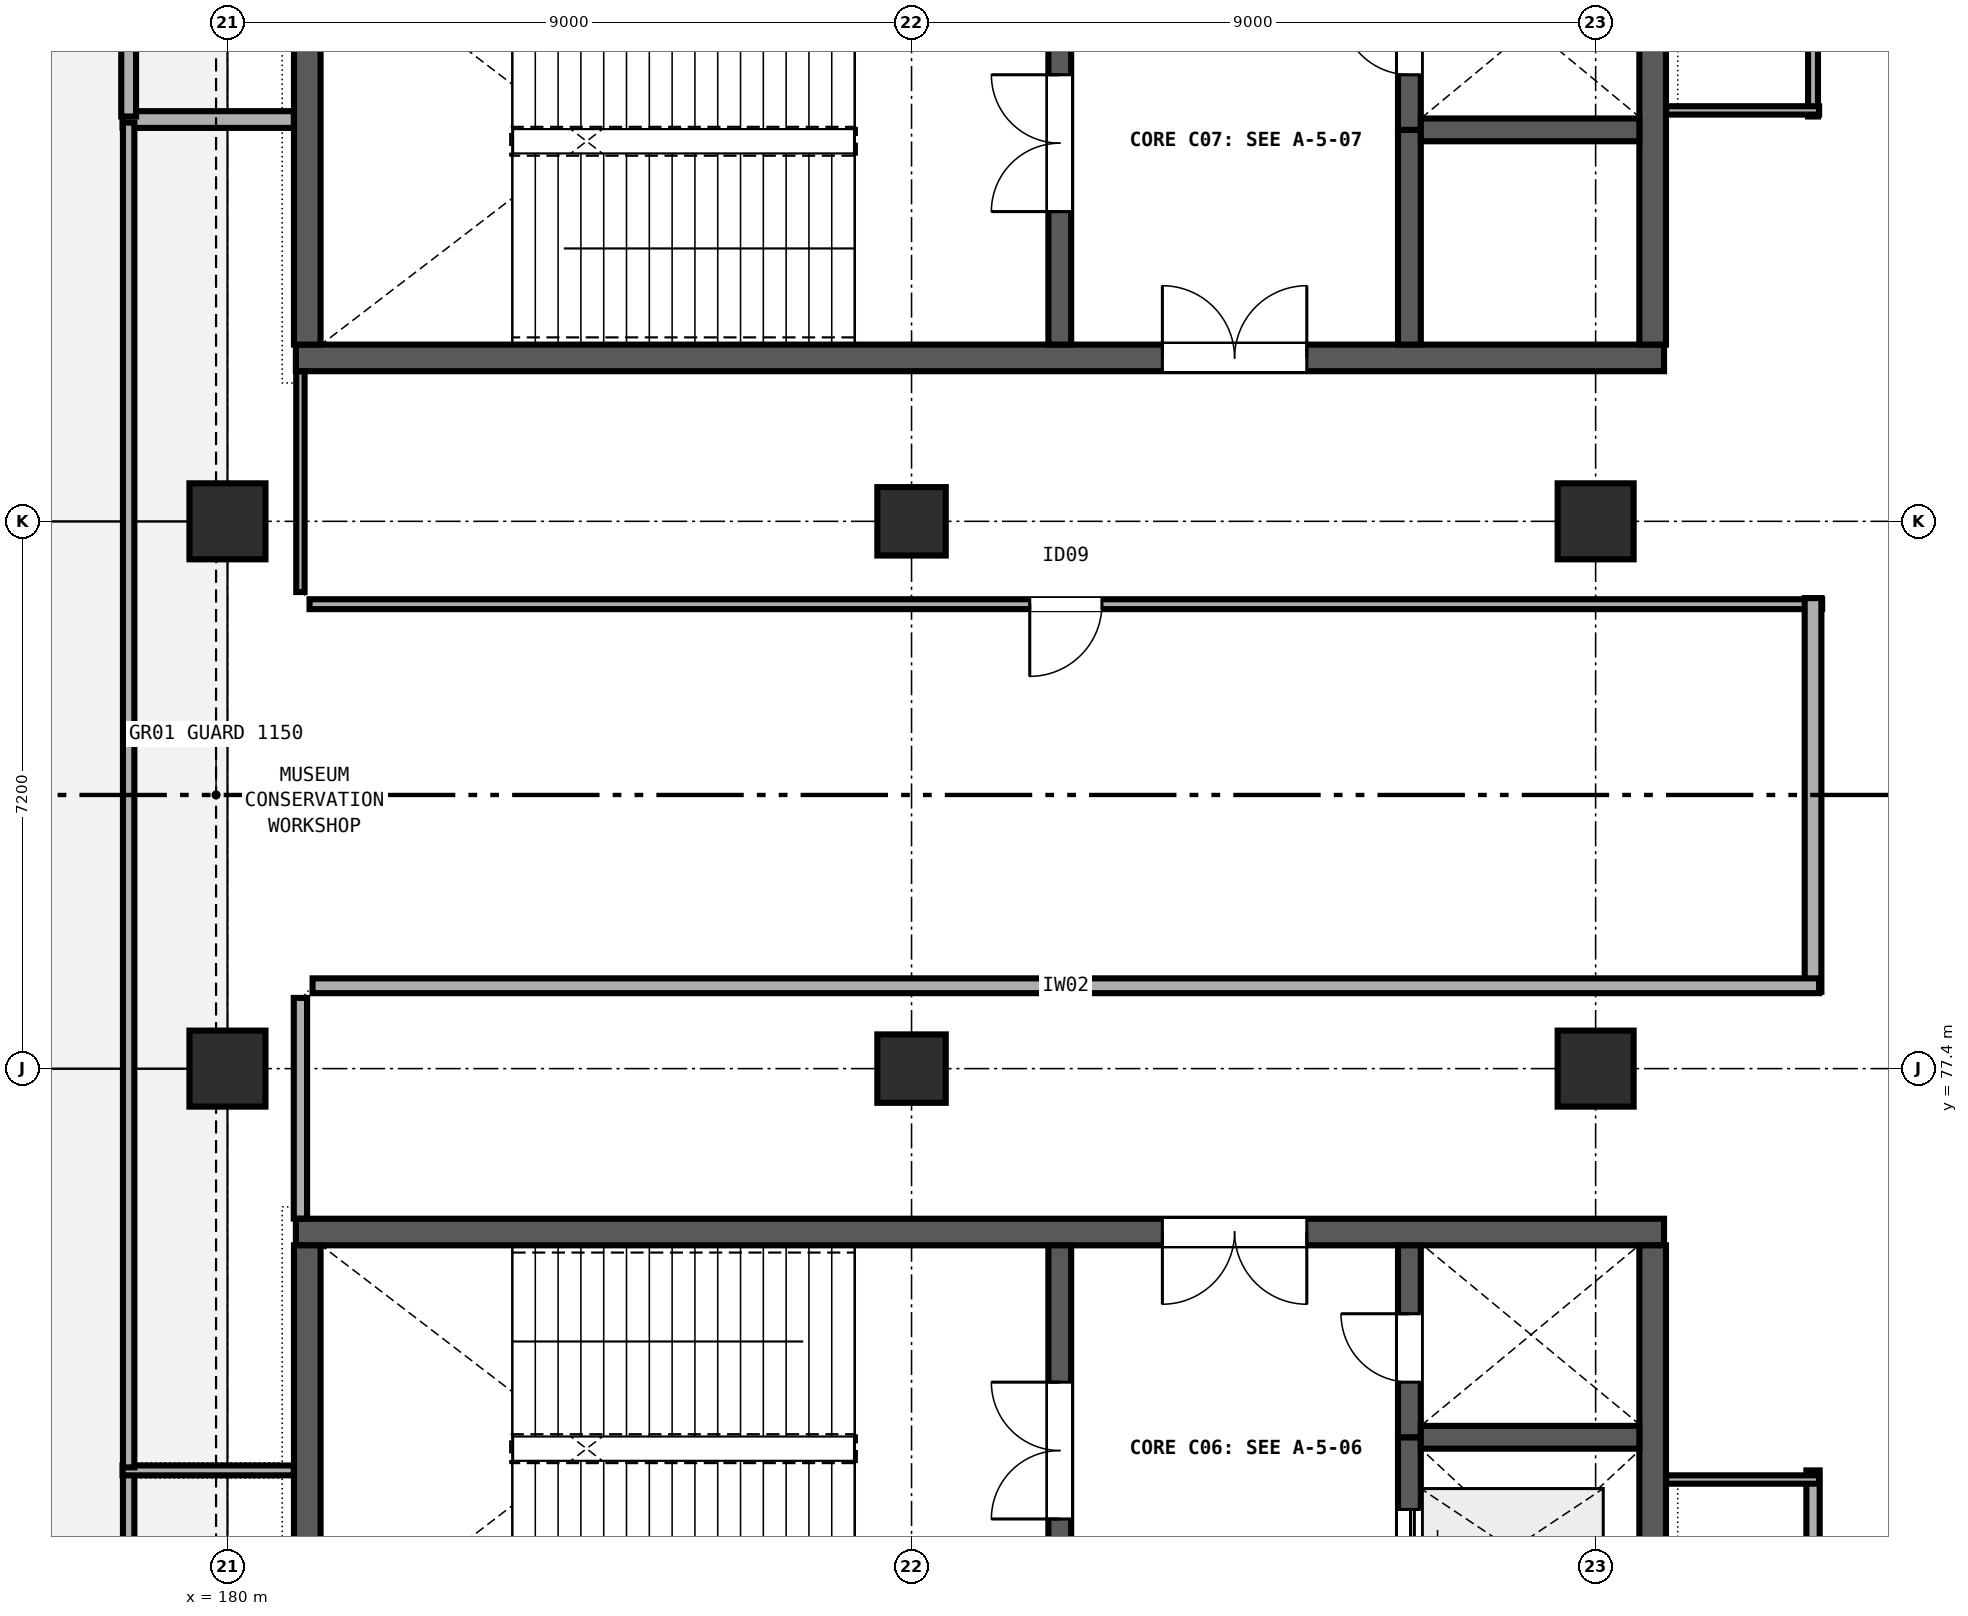
"""IFC4 building model, lengths in metres.
Left out: names, types, materials, properties, quantities, classifications, styles, units other than length and angle.
Written with IfcOpenShell. Run it as: python <this file> out.ifc"""

import sys

from ifc_helpers import new_model, si_unit, direction, frame, frame_2d, origin, origin_2d, place, context, subcontext, project, spatial, rectangle, extrude, element, fill, save


model = new_model("IFC4")
c1 = context("Model", 3, precision=1e-05, world=origin(), true_north=direction((0.0, 1.0)))
c2 = subcontext(c1, "Body", "Model", "MODEL_VIEW")
j1 = project(units=[si_unit("LENGTHUNIT", "METRE"), si_unit("PLANEANGLEUNIT", "RADIAN")], contexts=[c1])
p1 = place(None, origin())
s1 = spatial("IfcSite", under=j1, at=p1, CompositionType="ELEMENT")
p2 = place(p1, origin())
s2 = spatial("IfcBuilding", under=s1, at=p2, CompositionType="ELEMENT")
p3 = place(p2, frame((0.0, 0.0, 4.8)))
s3 = spatial("IfcBuildingStorey", under=s2, at=p3, CompositionType="ELEMENT", Elevation=4.8)
for number, where, z_axis, x_axis in (
    (1, (180.0, 77.4, 0.0), (0.0, 0.0, 1.0), (1.0, 0.0, 0.0)),
    (2, (180.0, 84.6, 0.0), (0.0, 0.0, 1.0), (1.0, 0.0, 0.0)),
):
    element("IfcColumn", number, at=place(p3, frame(where, z_axis=z_axis, x_axis=x_axis)), inside=s3, PredefinedType="COLUMN", context=c2, shape_type="SweptSolid", body=[
        extrude(rectangle(XDim=1.0, YDim=1.0, at=origin_2d()), origin(), (0.0, 0.0, 1.0), 4.8),
    ])
for number, where, z_axis, x_axis in (
    (3, (189.0, 77.4, 0.0), (0.0, 0.0, 1.0), (1.0, 0.0, 0.0)),
    (4, (189.0, 84.6, 0.0), (0.0, 0.0, 1.0), (1.0, 0.0, 0.0)),
):
    element("IfcColumn", number, at=place(p3, frame(where, z_axis=z_axis, x_axis=x_axis)), inside=s3, PredefinedType="COLUMN", context=c2, shape_type="SweptSolid", body=[
        extrude(rectangle(XDim=0.9, YDim=0.9, at=origin_2d()), origin(), (0.0, 0.0, 1.0), 4.8),
    ])
for number, where, z_axis, x_axis in (
    (5, (198.0, 77.4, 0.0), (0.0, 0.0, 1.0), (1.0, 0.0, 0.0)),
    (6, (198.0, 84.6, 0.0), (0.0, 0.0, 1.0), (1.0, 0.0, 0.0)),
):
    element("IfcColumn", number, at=place(p3, frame(where, z_axis=z_axis, x_axis=x_axis)), inside=s3, PredefinedType="COLUMN", context=c2, shape_type="SweptSolid", body=[
        extrude(rectangle(XDim=1.0, YDim=1.0, at=origin_2d()), origin(), (0.0, 0.0, 1.0), 4.8),
    ])
p4 = place(p3, frame((198.9, 75.25, 0.0), z_axis=(0.0, 0.0, 1.0), x_axis=(-1.0, 0.0, 0.0)))
e7 = element("IfcWall", 7, at=p4, inside=s3, PredefinedType="SHEAR", context=c2, shape_type="SweptSolid", body=[
    extrude(rectangle(XDim=18.0, YDim=0.35, at=frame_2d((9.0, 0.0))), origin(), (0.0, 0.0, 1.0), 4.52),
])
p5 = place(p4, frame((4.7, 0.0, 0.0)))
e8 = element("IfcOpeningElement", 8, at=p5, cuts=e7, PredefinedType="OPENING", context=c2, shape_type="SweptSolid", body=[
    extrude(rectangle(XDim=1.9, YDim=2.25, at=frame_2d((0.95, 1.125))), frame((0.0, 0.185, 0.0), z_axis=(0.0, -1.0, 0.0), x_axis=(1.0, 0.0, 0.0)), (0.0, 0.0, 1.0), 0.37),
])
for number, where, z_axis, x_axis in (
    (9, (181.05, 75.075, 0.0), (0.0, 0.0, 1.0), (0.0, -1.0, 0.0)),
    (10, (198.75, 69.725, 0.0), (0.0, 0.0, 1.0), (0.0, 1.0, 0.0)),
):
    element("IfcWall", number, at=place(p3, frame(where, z_axis=z_axis, x_axis=x_axis)), inside=s3, PredefinedType="SHEAR", context=c2, shape_type="SweptSolid", body=[
        extrude(rectangle(XDim=5.35, YDim=0.35, at=frame_2d((2.675, 0.0))), origin(), (0.0, 0.0, 1.0), 4.52),
    ])
p6 = place(p3, frame((190.95, 69.725, 0.0), z_axis=(0.0, 0.0, 1.0), x_axis=(0.0, 1.0, 0.0)))
e11 = element("IfcWall", 11, at=p6, inside=s3, PredefinedType="SHEAR", context=c2, shape_type="SweptSolid", body=[
    extrude(rectangle(XDim=5.35, YDim=0.3, at=frame_2d((2.675, 0.0))), origin(), (0.0, 0.0, 1.0), 4.52),
])
p7 = place(p6, frame((1.75, 0.0, 0.0)))
e12 = element("IfcOpeningElement", 12, at=p7, cuts=e11, PredefinedType="OPENING", context=c2, shape_type="SweptSolid", body=[
    extrude(rectangle(XDim=1.8, YDim=2.25, at=frame_2d((0.9, 1.125))), frame((0.0, 0.16, 0.0), z_axis=(0.0, -1.0, 0.0), x_axis=(1.0, 0.0, 0.0)), (0.0, 0.0, 1.0), 0.32),
])
p8 = place(p3, frame((195.55, 69.725, 0.0), z_axis=(0.0, 0.0, 1.0), x_axis=(0.0, 1.0, 0.0)))
e13 = element("IfcWall", 13, at=p8, inside=s3, PredefinedType="SHEAR", context=c2, shape_type="SweptSolid", body=[
    extrude(rectangle(XDim=2.825, YDim=0.3, at=frame_2d((1.413, 0.0))), origin(), (0.0, 0.0, 1.0), 4.52),
])
p9 = place(p8, frame((0.775, 0.0, 0.0)))
e14 = element("IfcOpeningElement", 14, at=p9, cuts=e13, PredefinedType="OPENING", context=c2, shape_type="SweptSolid", body=[
    extrude(rectangle(XDim=1.1, YDim=2.1, at=frame_2d((0.55, 1.05))), frame((0.0, 0.16, 0.0), z_axis=(0.0, -1.0, 0.0), x_axis=(1.0, 0.0, 0.0)), (0.0, 0.0, 1.0), 0.32),
])
p10 = place(p3, frame((195.55, 72.55, 0.0), z_axis=(0.0, 0.0, 1.0), x_axis=(0.0, 1.0, 0.0)))
e15 = element("IfcWall", 15, at=p10, inside=s3, PredefinedType="SHEAR", context=c2, shape_type="SweptSolid", body=[
    extrude(rectangle(XDim=2.525, YDim=0.3, at=frame_2d((1.262, 0.0))), origin(), (0.0, 0.0, 1.0), 4.52),
])
p11 = place(p10, frame((0.725, 0.0, 0.0)))
e16 = element("IfcOpeningElement", 16, at=p11, cuts=e15, PredefinedType="OPENING", context=c2, shape_type="SweptSolid", body=[
    extrude(rectangle(XDim=0.9, YDim=2.1, at=frame_2d((0.45, 1.05))), frame((0.0, 0.16, 0.0), z_axis=(0.0, -1.0, 0.0), x_axis=(1.0, 0.0, 0.0)), (0.0, 0.0, 1.0), 0.32),
])
p12 = place(p3, frame((195.7, 72.55, 0.0), z_axis=(0.0, 0.0, 1.0), x_axis=(1.0, 0.0, 0.0)))
e17 = element("IfcWall", 17, at=p12, inside=s3, PredefinedType="SHEAR", context=c2, shape_type="SweptSolid", body=[
    extrude(rectangle(XDim=2.875, YDim=0.3, at=frame_2d((1.438, 0.0))), origin(), (0.0, 0.0, 1.0), 4.52),
])
p13 = place(p3, frame((180.9, 86.75, 0.0), z_axis=(0.0, 0.0, 1.0), x_axis=(1.0, 0.0, 0.0)))
e18 = element("IfcWall", 18, at=p13, inside=s3, PredefinedType="SHEAR", context=c2, shape_type="SweptSolid", body=[
    extrude(rectangle(XDim=18.0, YDim=0.35, at=frame_2d((9.0, 0.0))), origin(), (0.0, 0.0, 1.0), 4.52),
])
p14 = place(p13, frame((11.4, 0.0, 0.0)))
e19 = element("IfcOpeningElement", 19, at=p14, cuts=e18, PredefinedType="OPENING", context=c2, shape_type="SweptSolid", body=[
    extrude(rectangle(XDim=1.9, YDim=2.25, at=frame_2d((0.95, 1.125))), frame((0.0, 0.185, 0.0), z_axis=(0.0, -1.0, 0.0), x_axis=(1.0, 0.0, 0.0)), (0.0, 0.0, 1.0), 0.37),
])
for number, where, z_axis, x_axis in (
    (20, (181.05, 92.275, 0.0), (0.0, 0.0, 1.0), (0.0, -1.0, 0.0)),
    (21, (198.75, 86.925, 0.0), (0.0, 0.0, 1.0), (0.0, 1.0, 0.0)),
):
    element("IfcWall", number, at=place(p3, frame(where, z_axis=z_axis, x_axis=x_axis)), inside=s3, PredefinedType="SHEAR", context=c2, shape_type="SweptSolid", body=[
        extrude(rectangle(XDim=5.35, YDim=0.35, at=frame_2d((2.675, 0.0))), origin(), (0.0, 0.0, 1.0), 4.52),
    ])
p15 = place(p3, frame((190.95, 86.925, 0.0), z_axis=(0.0, 0.0, 1.0), x_axis=(0.0, 1.0, 0.0)))
e22 = element("IfcWall", 22, at=p15, inside=s3, PredefinedType="SHEAR", context=c2, shape_type="SweptSolid", body=[
    extrude(rectangle(XDim=5.35, YDim=0.3, at=frame_2d((2.675, 0.0))), origin(), (0.0, 0.0, 1.0), 4.52),
])
p16 = place(p15, frame((1.75, 0.0, 0.0)))
e23 = element("IfcOpeningElement", 23, at=p16, cuts=e22, PredefinedType="OPENING", context=c2, shape_type="SweptSolid", body=[
    extrude(rectangle(XDim=1.8, YDim=2.25, at=frame_2d((0.9, 1.125))), frame((0.0, 0.16, 0.0), z_axis=(0.0, -1.0, 0.0), x_axis=(1.0, 0.0, 0.0)), (0.0, 0.0, 1.0), 0.32),
])
p17 = place(p3, frame((195.55, 86.925, 0.0), z_axis=(0.0, 0.0, 1.0), x_axis=(0.0, 1.0, 0.0)))
e24 = element("IfcWall", 24, at=p17, inside=s3, PredefinedType="SHEAR", context=c2, shape_type="SweptSolid", body=[
    extrude(rectangle(XDim=2.825, YDim=0.3, at=frame_2d((1.413, 0.0))), origin(), (0.0, 0.0, 1.0), 4.52),
])
p18 = place(p3, frame((195.55, 89.75, 0.0), z_axis=(0.0, 0.0, 1.0), x_axis=(0.0, 1.0, 0.0)))
e25 = element("IfcWall", 25, at=p18, inside=s3, PredefinedType="SHEAR", context=c2, shape_type="SweptSolid", body=[
    extrude(rectangle(XDim=2.525, YDim=0.3, at=frame_2d((1.262, 0.0))), origin(), (0.0, 0.0, 1.0), 4.52),
])
p19 = place(p18, frame((0.725, 0.0, 0.0)))
e26 = element("IfcOpeningElement", 26, at=p19, cuts=e25, PredefinedType="OPENING", context=c2, shape_type="SweptSolid", body=[
    extrude(rectangle(XDim=0.9, YDim=2.1, at=frame_2d((0.45, 1.05))), frame((0.0, 0.16, 0.0), z_axis=(0.0, -1.0, 0.0), x_axis=(1.0, 0.0, 0.0)), (0.0, 0.0, 1.0), 0.32),
])
p20 = place(p3, frame((195.7, 89.75, 0.0), z_axis=(0.0, 0.0, 1.0), x_axis=(1.0, 0.0, 0.0)))
e27 = element("IfcWall", 27, at=p20, inside=s3, PredefinedType="SHEAR", context=c2, shape_type="SweptSolid", body=[
    extrude(rectangle(XDim=2.875, YDim=0.3, at=frame_2d((1.438, 0.0))), origin(), (0.0, 0.0, 1.0), 4.52),
])
p21 = place(p3, frame((200.86, 99.79, 0.0), z_axis=(0.0, 0.0, 1.0), x_axis=(0.0, -1.0, 0.0)))
e28 = element("IfcWall", 28, at=p21, inside=s3, PredefinedType="PARTITIONING", context=c2, shape_type="SweptSolid", body=[
    extrude(rectangle(XDim=9.864, YDim=0.13, at=frame_2d((4.932, 0.0))), origin(), (0.0, 0.0, 1.0), 3.28),
])
p22 = place(p3, frame((200.94, 90.006, 0.0), z_axis=(0.0, 0.0, 1.0), x_axis=(-1.0, 0.0, 0.0)))
e29 = element("IfcWall", 29, at=p22, inside=s3, PredefinedType="PARTITIONING", context=c2, shape_type="SweptSolid", body=[
    extrude(rectangle(XDim=2.013, YDim=0.11, at=frame_2d((1.006, 0.0))), origin(), (0.0, 0.0, 1.0), 3.28),
])
p23 = place(p3, frame((180.873, 89.886, 0.0), z_axis=(0.0, 0.0, 1.0), x_axis=(-1.0, 0.0, 0.0)))
e30 = element("IfcWall", 30, at=p23, inside=s3, PredefinedType="PARTITIONING", context=c2, shape_type="SweptSolid", body=[
    extrude(rectangle(XDim=2.253, YDim=0.22, at=frame_2d((1.126, 0.0))), origin(), (0.0, 0.0, 1.0), 3.28),
])
p24 = place(p3, frame((178.7, 89.926, 0.0), z_axis=(0.0, 0.0, 1.0), x_axis=(0.0, 1.0, 0.0)))
e31 = element("IfcWall", 31, at=p24, inside=s3, PredefinedType="PARTITIONING", context=c2, shape_type="SweptSolid", body=[
    extrude(rectangle(XDim=5.554, YDim=0.195, at=frame_2d((2.777, 0.0))), origin(), (0.0, 0.0, 1.0), 3.28),
])
p25 = place(p3, frame((200.86, 62.17, 0.0), z_axis=(0.0, 0.0, 1.0), x_axis=(0.0, 1.0, 0.0)))
e32 = element("IfcWall", 32, at=p25, inside=s3, PredefinedType="PARTITIONING", context=c2, shape_type="SweptSolid", body=[
    extrude(rectangle(XDim=9.944, YDim=0.175, at=frame_2d((4.972, 0.0))), origin(), (0.0, 0.0, 1.0), 3.28),
])
p26 = place(p25, frame((4.122, 0.0, 0.0)))
e33 = element("IfcOpeningElement", 33, at=p26, cuts=e32, PredefinedType="OPENING", context=c2, shape_type="SweptSolid", body=[
    extrude(rectangle(XDim=1.7, YDim=2.2, at=frame_2d((0.85, 1.1))), frame((0.0, 0.097, 0.0), z_axis=(0.0, -1.0, 0.0), x_axis=(1.0, 0.0, 0.0)), (0.0, 0.0, 1.0), 0.195),
])
p27 = place(p3, frame((178.7, 66.52, 0.0), z_axis=(0.0, 0.0, 1.0), x_axis=(0.0, 1.0, 0.0)))
e34 = element("IfcWall", 34, at=p27, inside=s3, PredefinedType="PARTITIONING", context=c2, shape_type="SweptSolid", body=[
    extrude(rectangle(XDim=5.554, YDim=0.15, at=frame_2d((2.777, 0.0))), origin(), (0.0, 0.0, 1.0), 3.28),
])
p28 = place(p3, frame((178.62, 72.114, 0.0), z_axis=(0.0, 0.0, 1.0), x_axis=(1.0, 0.0, 0.0)))
e35 = element("IfcWall", 35, at=p28, inside=s3, PredefinedType="PARTITIONING", context=c2, shape_type="SweptSolid", body=[
    extrude(rectangle(XDim=2.253, YDim=0.13, at=frame_2d((1.126, 0.0))), origin(), (0.0, 0.0, 1.0), 3.28),
])
p29 = place(p3, frame((198.927, 71.994, 0.0), z_axis=(0.0, 0.0, 1.0), x_axis=(1.0, 0.0, 0.0)))
e36 = element("IfcWall", 36, at=p29, inside=s3, PredefinedType="PARTITIONING", context=c2, shape_type="SweptSolid", body=[
    extrude(rectangle(XDim=2.013, YDim=0.11, at=frame_2d((1.006, 0.0))), origin(), (0.0, 0.0, 1.0), 3.28),
])
p30 = place(p3, frame((200.98, 83.51, 0.0), z_axis=(0.0, 0.0, 1.0), x_axis=(-1.0, 0.0, 0.0)))
e37 = element("IfcWall", 37, at=p30, inside=s3, PredefinedType="PARTITIONING", context=c2, shape_type="SweptSolid", body=[
    extrude(rectangle(XDim=19.9, YDim=0.13, at=frame_2d((9.95, 0.0))), origin(), (0.0, 0.0, 1.0), 3.28),
])
p31 = place(p30, frame((9.475, 0.0, 0.0)))
e38 = element("IfcOpeningElement", 38, at=p31, cuts=e37, PredefinedType="OPENING", context=c2, shape_type="SweptSolid", body=[
    extrude(rectangle(XDim=0.95, YDim=2.1, at=frame_2d((0.475, 1.05))), frame((0.0, 0.075, 0.0), z_axis=(0.0, -1.0, 0.0), x_axis=(1.0, 0.0, 0.0)), (0.0, 0.0, 1.0), 0.15),
])
p32 = place(p3, frame((180.96, 86.573, 0.0), z_axis=(0.0, 0.0, 1.0), x_axis=(0.0, -1.0, 0.0)))
e39 = element("IfcWall", 39, at=p32, inside=s3, PredefinedType="PARTITIONING", context=c2, shape_type="SweptSolid", body=[
    extrude(rectangle(XDim=2.903, YDim=0.11, at=frame_2d((1.452, 0.0))), origin(), (0.0, 0.0, 1.0), 3.28),
])
p33 = place(p3, frame((200.86, 83.59, 0.0), z_axis=(0.0, 0.0, 1.0), x_axis=(0.0, -1.0, 0.0)))
e40 = element("IfcWall", 40, at=p33, inside=s3, PredefinedType="PARTITIONING", context=c2, shape_type="SweptSolid", body=[
    extrude(rectangle(XDim=5.18, YDim=0.22, at=frame_2d((2.59, 0.0))), origin(), (0.0, 0.0, 1.0), 3.28),
])
p34 = place(p3, frame((200.94, 78.49, 0.0), z_axis=(0.0, 0.0, 1.0), x_axis=(-1.0, 0.0, 0.0)))
e41 = element("IfcWall", 41, at=p34, inside=s3, PredefinedType="PARTITIONING", context=c2, shape_type="SweptSolid", body=[
    extrude(rectangle(XDim=19.82, YDim=0.195, at=frame_2d((9.91, 0.0))), origin(), (0.0, 0.0, 1.0), 3.28),
])
p35 = place(p3, frame((180.96, 78.33, 0.0), z_axis=(0.0, 0.0, 1.0), x_axis=(0.0, -1.0, 0.0)))
e42 = element("IfcWall", 42, at=p35, inside=s3, PredefinedType="PARTITIONING", context=c2, shape_type="SweptSolid", body=[
    extrude(rectangle(XDim=2.903, YDim=0.175, at=frame_2d((1.452, 0.0))), origin(), (0.0, 0.0, 1.0), 3.28),
])
p36 = place(p3, frame((178.7, 72.154, 0.0), z_axis=(0.0, 0.0, 1.0), x_axis=(0.0, 1.0, 0.0)))
e43 = element("IfcWall", 43, at=p36, inside=s3, PredefinedType="PARTITIONING", context=c2, shape_type="SweptSolid", body=[
    extrude(rectangle(XDim=17.692, YDim=0.15, at=frame_2d((8.846, 0.0))), origin(), (0.0, 0.0, 1.0), 3.28),
])
p37 = place(p7, origin())
e44 = element("IfcDoor", 44, at=p37, inside=s3, OperationType="DOUBLE_DOOR_SINGLE_SWING", PredefinedType="DOOR", context=c2, shape_type="SweptSolid", body=[
    extrude(rectangle(XDim=1.8, YDim=2.25, at=frame_2d((0.9, 1.125))), frame((0.0, 0.025, 0.0), z_axis=(0.0, -1.0, 0.0), x_axis=(1.0, 0.0, 0.0)), (0.0, 0.0, 1.0), 0.05),
])
fill(e12, e44)
p38 = place(p11, origin())
e45 = element("IfcDoor", 45, at=p38, inside=s3, OperationType="SINGLE_SWING_RIGHT", PredefinedType="DOOR", context=c2, shape_type="SweptSolid", body=[
    extrude(rectangle(XDim=0.9, YDim=2.1, at=frame_2d((0.45, 1.05))), frame((0.0, 0.025, 0.0), z_axis=(0.0, -1.0, 0.0), x_axis=(1.0, 0.0, 0.0)), (0.0, 0.0, 1.0), 0.05),
])
fill(e16, e45)
p39 = place(p9, origin())
e46 = element("IfcDoor", 46, at=p39, inside=s3, OperationType="DOUBLE_DOOR_SLIDING", PredefinedType="DOOR", context=c2, shape_type="SweptSolid", body=[
    extrude(rectangle(XDim=1.1, YDim=2.1, at=frame_2d((0.55, 1.05))), frame((0.0, 0.025, 0.0), z_axis=(0.0, -1.0, 0.0), x_axis=(1.0, 0.0, 0.0)), (0.0, 0.0, 1.0), 0.05),
])
fill(e14, e46)
p40 = place(p5, origin())
e47 = element("IfcDoor", 47, at=p40, inside=s3, OperationType="DOUBLE_DOOR_SINGLE_SWING", PredefinedType="DOOR", context=c2, shape_type="SweptSolid", body=[
    extrude(rectangle(XDim=1.9, YDim=2.25, at=frame_2d((0.95, 1.125))), frame((0.0, 0.025, 0.0), z_axis=(0.0, -1.0, 0.0), x_axis=(1.0, 0.0, 0.0)), (0.0, 0.0, 1.0), 0.05),
])
fill(e8, e47)
p41 = place(p16, origin())
e48 = element("IfcDoor", 48, at=p41, inside=s3, OperationType="DOUBLE_DOOR_SINGLE_SWING", PredefinedType="DOOR", context=c2, shape_type="SweptSolid", body=[
    extrude(rectangle(XDim=1.8, YDim=2.25, at=frame_2d((0.9, 1.125))), frame((0.0, 0.025, 0.0), z_axis=(0.0, -1.0, 0.0), x_axis=(1.0, 0.0, 0.0)), (0.0, 0.0, 1.0), 0.05),
])
fill(e23, e48)
p42 = place(p19, origin())
e49 = element("IfcDoor", 49, at=p42, inside=s3, OperationType="SINGLE_SWING_RIGHT", PredefinedType="DOOR", context=c2, shape_type="SweptSolid", body=[
    extrude(rectangle(XDim=0.9, YDim=2.1, at=frame_2d((0.45, 1.05))), frame((0.0, 0.025, 0.0), z_axis=(0.0, -1.0, 0.0), x_axis=(1.0, 0.0, 0.0)), (0.0, 0.0, 1.0), 0.05),
])
fill(e26, e49)
p43 = place(p14, origin())
e50 = element("IfcDoor", 50, at=p43, inside=s3, OperationType="DOUBLE_DOOR_SINGLE_SWING", PredefinedType="DOOR", context=c2, shape_type="SweptSolid", body=[
    extrude(rectangle(XDim=1.9, YDim=2.25, at=frame_2d((0.95, 1.125))), frame((0.0, 0.025, 0.0), z_axis=(0.0, -1.0, 0.0), x_axis=(1.0, 0.0, 0.0)), (0.0, 0.0, 1.0), 0.05),
])
fill(e19, e50)
p44 = place(p31, origin())
e51 = element("IfcDoor", 51, at=p44, inside=s3, OperationType="SINGLE_SWING_RIGHT", PredefinedType="DOOR", context=c2, shape_type="SweptSolid", body=[
    extrude(rectangle(XDim=0.95, YDim=2.1, at=frame_2d((0.475, 1.05))), frame((0.0, 0.025, 0.0), z_axis=(0.0, -1.0, 0.0), x_axis=(1.0, 0.0, 0.0)), (0.0, 0.0, 1.0), 0.05),
])
fill(e38, e51)
save(model, sys.argv[1])
